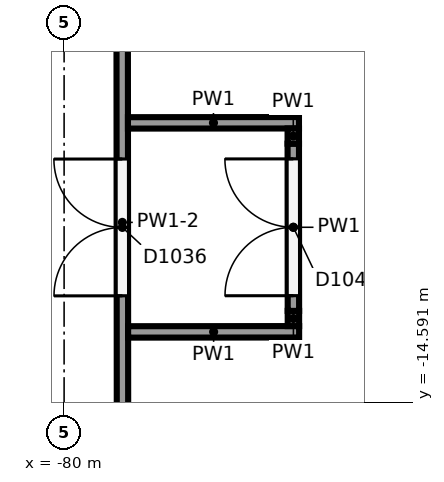
"""IFC4 building model, lengths in metres.
Left out: names, types, materials, properties, quantities, classifications, styles, units other than length and angle.
Written with IfcOpenShell. Run it as: python <this file> out.ifc"""

import sys

from ifc_helpers import new_model, si_unit, direction, frame, frame_2d, origin, place, context, subcontext, project, spatial, rectangle, extrude, element, fill, save


model = new_model("IFC4")
c1 = context("Model", 3, precision=1e-05, world=origin(), true_north=direction((0.0, 1.0)))
c2 = subcontext(c1, "Body", "Model", "MODEL_VIEW")
j1 = project(units=[si_unit("LENGTHUNIT", "METRE"), si_unit("PLANEANGLEUNIT", "RADIAN")], contexts=[c1])
p1 = place(None, origin())
s1 = spatial("IfcSite", under=j1, at=p1, CompositionType="ELEMENT")
p2 = place(p1, origin())
s2 = spatial("IfcBuilding", under=s1, at=p2, CompositionType="ELEMENT")
p3 = place(p2, frame((0.0, 0.0, 12.0)))
s3 = spatial("IfcBuildingStorey", under=s2, at=p3, CompositionType="ELEMENT", Elevation=12.0)
p4 = place(p3, frame((-79.23, -17.64, 0.0), z_axis=(0.0, 0.0, 1.0), x_axis=(-0.0007662833, 0.999999706405, 0.0)))
e1 = element("IfcWall", 1, at=p4, inside=s3, PredefinedType="PARTITIONING", context=c2, shape_type="SweptSolid", body=[
    extrude(rectangle(XDim=10.833, YDim=0.15, at=frame_2d((5.416, 0.0))), origin(), (0.0, 0.0, 1.0), 4.2),
])
p5 = place(p4, frame((4.45, 0.0, 0.0)))
e2 = element("IfcOpeningElement", 2, at=p5, cuts=e1, PredefinedType="OPENING", context=c2, shape_type="SweptSolid", body=[
    extrude(rectangle(XDim=1.8, YDim=2.1, at=frame_2d((0.9, 1.05))), frame((0.0, 0.085, 0.0), z_axis=(0.0, -1.0, 0.0), x_axis=(1.0, 0.0, 0.0)), (0.0, 0.0, 1.0), 0.17),
])
for number, where, z_axis, x_axis in (
    (3, (-79.158, -13.665, 0.0), (0.0, 0.0, 1.0), (1.0, 0.001, 0.0)),
    (4, (-79.16, -10.915, 0.0), (0.0, 0.0, 1.0), (1.0, 0.001, 0.0)),
):
    element("IfcWall", number, at=place(p3, frame(where, z_axis=z_axis, x_axis=x_axis)), inside=s3, PredefinedType="PARTITIONING", context=c2, shape_type="SweptSolid", body=[
        extrude(rectangle(XDim=2.25, YDim=0.15, at=frame_2d((1.125, 0.0))), origin(), (0.0, 0.0, 1.0), 5.65),
    ])
p6 = place(p3, frame((-76.983, -13.588, 0.0), z_axis=(0.0, 0.0, 1.0), x_axis=(0.0, 1.0, 0.0)))
e5 = element("IfcWall", 5, at=p6, inside=s3, PredefinedType="PARTITIONING", context=c2, shape_type="SweptSolid", body=[
    extrude(rectangle(XDim=0.2, YDim=0.15, at=frame_2d((0.1, 0.0))), origin(), (0.0, 0.0, 1.0), 5.65),
])
p7 = place(p3, frame((-76.983, -13.388, 0.0), z_axis=(0.0, 0.0, 1.0), x_axis=(-0.000776828087, 0.999999698269, 0.0)))
e6 = element("IfcWall", 6, at=p7, inside=s3, PredefinedType="PARTITIONING", context=c2, shape_type="SweptSolid", body=[
    extrude(rectangle(XDim=2.2, YDim=0.15, at=frame_2d((1.1, 0.0))), origin(), (0.0, 0.0, 1.0), 5.65),
])
p8 = place(p7, frame((0.2, 0.0, 0.0)))
e7 = element("IfcOpeningElement", 7, at=p8, cuts=e6, PredefinedType="OPENING", context=c2, shape_type="SweptSolid", body=[
    extrude(rectangle(XDim=1.8, YDim=2.1, at=frame_2d((0.9, 1.05))), frame((0.0, 0.085, 0.0), z_axis=(0.0, -1.0, 0.0), x_axis=(1.0, 0.0, 0.0)), (0.0, 0.0, 1.0), 0.17),
])
p9 = place(p3, frame((-76.985, -11.188, 0.0), z_axis=(0.0, 0.0, 1.0), x_axis=(-0.001221000311, 0.999999254579, 0.0)))
e8 = element("IfcWall", 8, at=p9, inside=s3, PredefinedType="PARTITIONING", context=c2, shape_type="SweptSolid", body=[
    extrude(rectangle(XDim=0.2, YDim=0.15, at=frame_2d((0.1, 0.0))), origin(), (0.0, 0.0, 1.0), 5.65),
])
p10 = place(p5, origin())
e9 = element("IfcDoor", 9, at=p10, inside=s3, OperationType="DOUBLE_DOOR_SINGLE_SWING", PredefinedType="DOOR", context=c2, shape_type="SweptSolid", body=[
    extrude(rectangle(XDim=1.8, YDim=2.1, at=frame_2d((0.9, 1.05))), frame((0.0, 0.025, 0.0), z_axis=(0.0, -1.0, 0.0), x_axis=(1.0, 0.0, 0.0)), (0.0, 0.0, 1.0), 0.05),
])
fill(e2, e9)
p11 = place(p8, origin())
e10 = element("IfcDoor", 10, at=p11, inside=s3, OperationType="DOUBLE_DOOR_SINGLE_SWING", PredefinedType="DOOR", context=c2, shape_type="SweptSolid", body=[
    extrude(rectangle(XDim=1.8, YDim=2.1, at=frame_2d((0.9, 1.05))), frame((0.0, 0.025, 0.0), z_axis=(0.0, -1.0, 0.0), x_axis=(1.0, 0.0, 0.0)), (0.0, 0.0, 1.0), 0.05),
])
fill(e7, e10)
save(model, sys.argv[1])
